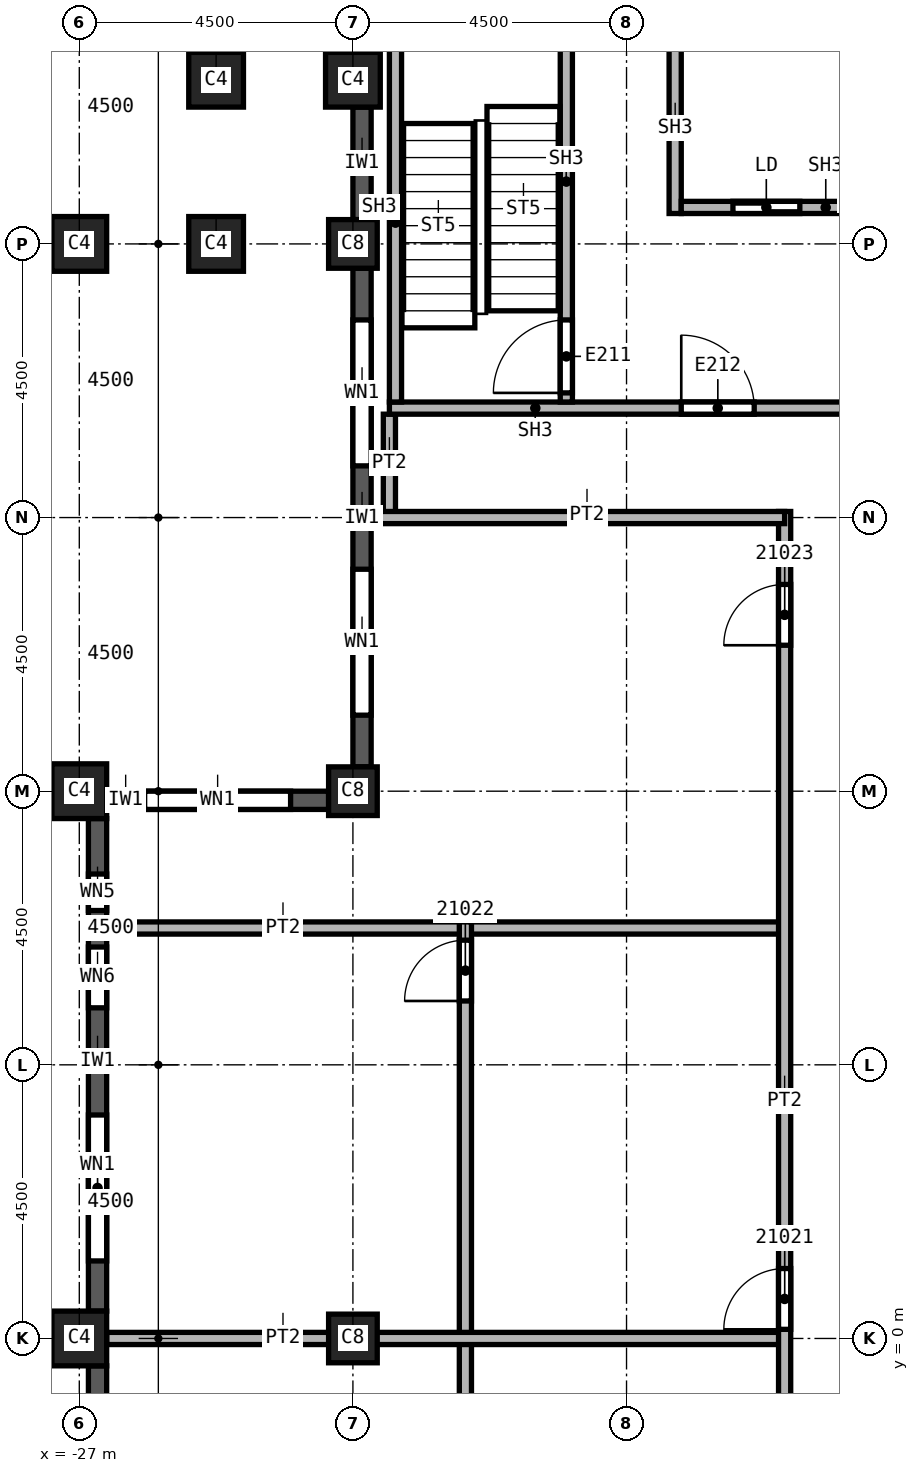
"""IFC4 building model, lengths in metres.
Left out: names, types, materials, properties, quantities, classifications, styles, units other than length and angle.
Written with IfcOpenShell. Run it as: python <this file> out.ifc"""

import sys

from ifc_helpers import new_model, si_unit, direction, frame, frame_2d, origin, origin_2d, place, context, subcontext, project, spatial, rectangle, extrude, element, fill, save


model = new_model("IFC4")
c1 = context("Model", 3, precision=1e-05, world=origin(), true_north=direction((0.0, 1.0)))
c2 = subcontext(c1, "Body", "Model", "MODEL_VIEW")
j1 = project(units=[si_unit("LENGTHUNIT", "METRE"), si_unit("PLANEANGLEUNIT", "RADIAN")], contexts=[c1])
p1 = place(None, origin())
s1 = spatial("IfcSite", under=j1, at=p1, CompositionType="ELEMENT")
p2 = place(p1, origin())
s2 = spatial("IfcBuilding", under=s1, at=p2, CompositionType="ELEMENT")
p3 = place(p2, frame((0.0, 0.0, 300.0)))
s3 = spatial("IfcBuildingStorey", under=s2, at=p3, CompositionType="ELEMENT", Elevation=300.0)
for number, where, z_axis, x_axis in (
    (1, (-22.5, 0.0, 0.0), (0.0, 0.0, 1.0), (1.0, 0.0, 0.0)),
    (2, (-22.5, 9.0, 0.0), (0.0, 0.0, 1.0), (1.0, 0.0, 0.0)),
    (3, (-22.5, 18.0, 0.0), (0.0, 0.0, 1.0), (1.0, 0.0, 0.0)),
):
    element("IfcColumn", number, at=place(p3, frame(where, z_axis=z_axis, x_axis=x_axis)), inside=s3, PredefinedType="COLUMN", context=c2, shape_type="SweptSolid", body=[
        extrude(rectangle(XDim=0.8, YDim=0.8, at=origin_2d()), origin(), (0.0, 0.0, 1.0), 3.74),
    ])
for number, where, z_axis, x_axis in (
    (4, (-27.0, 0.0, 0.0), (0.0, 0.0, 1.0), (0.0, 1.0, 0.0)),
    (5, (-27.0, 9.0, 0.0), (0.0, 0.0, 1.0), (0.0, 1.0, 0.0)),
    (6, (-27.0, 18.0, 0.0), (0.0, 0.0, 1.0), (0.0, 1.0, 0.0)),
    (7, (-22.5, 20.7, 0.0), (0.0, 0.0, 1.0), (1.0, 0.0, 0.0)),
    (8, (-24.75, 20.7, 0.0), (0.0, 0.0, 1.0), (1.0, 0.0, 0.0)),
    (9, (-24.75, 18.0, 0.0), (0.0, 0.0, 1.0), (1.0, 0.0, 0.0)),
):
    element("IfcColumn", number, at=place(p3, frame(where, z_axis=z_axis, x_axis=x_axis)), inside=s3, PredefinedType="COLUMN", context=c2, shape_type="SweptSolid", body=[
        extrude(rectangle(XDim=0.9, YDim=0.9, at=origin_2d()), origin(), (0.0, 0.0, 1.0), 3.74),
    ])
p4 = place(p3, frame((-26.7, 8.55, 0.0), z_axis=(0.0, 0.0, 1.0), x_axis=(0.0, -1.0, 0.0)))
e10 = element("IfcWall", 10, at=p4, inside=s3, PredefinedType="SOLIDWALL", context=c2, shape_type="SweptSolid", body=[
    extrude(rectangle(XDim=8.1, YDim=0.3, at=frame_2d((4.05, 0.0))), origin(), (0.0, 0.0, 1.0), 3.14),
])
p5 = place(p4, frame((4.875, 0.0, 0.8)))
e11 = element("IfcOpeningElement", 11, at=p5, cuts=e10, PredefinedType="OPENING", context=c2, shape_type="SweptSolid", body=[
    extrude(rectangle(XDim=2.4, YDim=1.95, at=frame_2d((1.2, 0.975))), frame((0.0, 0.15, 0.0), z_axis=(0.0, -1.0, 0.0), x_axis=(1.0, 0.0, 0.0)), (0.0, 0.0, 1.0), 0.3),
])
p6 = place(p4, frame((0.913, 0.0, 0.8)))
e12 = element("IfcOpeningElement", 12, at=p6, cuts=e10, PredefinedType="OPENING", context=c2, shape_type="SweptSolid", body=[
    extrude(rectangle(XDim=0.6, YDim=1.95, at=frame_2d((0.3, 0.975))), frame((0.0, 0.15, 0.0), z_axis=(0.0, -1.0, 0.0), x_axis=(1.0, 0.0, 0.0)), (0.0, 0.0, 1.0), 0.3),
])
p7 = place(p4, frame((2.113, 0.0, 0.8)))
e13 = element("IfcOpeningElement", 13, at=p7, cuts=e10, PredefinedType="OPENING", context=c2, shape_type="SweptSolid", body=[
    extrude(rectangle(XDim=1.0, YDim=1.95, at=frame_2d((0.5, 0.975))), frame((0.0, 0.15, 0.0), z_axis=(0.0, -1.0, 0.0), x_axis=(1.0, 0.0, 0.0)), (0.0, 0.0, 1.0), 0.3),
])
p8 = place(p3, frame((-26.7, -0.45, 0.0), z_axis=(0.0, 0.0, 1.0), x_axis=(0.0, -1.0, 0.0)))
e14 = element("IfcWall", 14, at=p8, inside=s3, PredefinedType="SOLIDWALL", context=c2, shape_type="SweptSolid", body=[
    extrude(rectangle(XDim=8.1, YDim=0.3, at=frame_2d((4.05, 0.0))), origin(), (0.0, 0.0, 1.0), 3.14),
])
p9 = place(p8, frame((0.825, 0.0, 0.8)))
e15 = element("IfcOpeningElement", 15, at=p9, cuts=e14, PredefinedType="OPENING", context=c2, shape_type="SweptSolid", body=[
    extrude(rectangle(XDim=2.4, YDim=1.95, at=frame_2d((1.2, 0.975))), frame((0.0, 0.15, 0.0), z_axis=(0.0, -1.0, 0.0), x_axis=(1.0, 0.0, 0.0)), (0.0, 0.0, 1.0), 0.3),
])
p10 = place(p8, frame((4.875, 0.0, 0.8)))
e16 = element("IfcOpeningElement", 16, at=p10, cuts=e14, PredefinedType="OPENING", context=c2, shape_type="SweptSolid", body=[
    extrude(rectangle(XDim=2.4, YDim=1.95, at=frame_2d((1.2, 0.975))), frame((0.0, 0.15, 0.0), z_axis=(0.0, -1.0, 0.0), x_axis=(1.0, 0.0, 0.0)), (0.0, 0.0, 1.0), 0.3),
])
p11 = place(p3, frame((-22.35, 17.6, 0.0), z_axis=(0.0, 0.0, 1.0), x_axis=(0.0, -1.0, 0.0)))
e17 = element("IfcWall", 17, at=p11, inside=s3, PredefinedType="SOLIDWALL", context=c2, shape_type="SweptSolid", body=[
    extrude(rectangle(XDim=8.2, YDim=0.3, at=frame_2d((4.1, 0.0))), origin(), (0.0, 0.0, 1.0), 3.14),
])
p12 = place(p11, frame((0.85, 0.0, 0.8)))
e18 = element("IfcOpeningElement", 18, at=p12, cuts=e17, PredefinedType="OPENING", context=c2, shape_type="SweptSolid", body=[
    extrude(rectangle(XDim=2.4, YDim=1.95, at=frame_2d((1.2, 0.975))), frame((0.0, 0.15, 0.0), z_axis=(0.0, -1.0, 0.0), x_axis=(1.0, 0.0, 0.0)), (0.0, 0.0, 1.0), 0.3),
])
p13 = place(p11, frame((4.95, 0.0, 0.8)))
e19 = element("IfcOpeningElement", 19, at=p13, cuts=e17, PredefinedType="OPENING", context=c2, shape_type="SweptSolid", body=[
    extrude(rectangle(XDim=2.4, YDim=1.95, at=frame_2d((1.2, 0.975))), frame((0.0, 0.15, 0.0), z_axis=(0.0, -1.0, 0.0), x_axis=(1.0, 0.0, 0.0)), (0.0, 0.0, 1.0), 0.3),
])
p14 = place(p3, frame((-22.35, 20.25, 0.0), z_axis=(0.0, 0.0, 1.0), x_axis=(0.0, -1.0, 0.0)))
e20 = element("IfcWall", 20, at=p14, inside=s3, PredefinedType="SOLIDWALL", context=c2, shape_type="SweptSolid", body=[
    extrude(rectangle(XDim=1.85, YDim=0.3, at=frame_2d((0.925, 0.0))), origin(), (0.0, 0.0, 1.0), 3.14),
])
p15 = place(p3, frame((-22.9, 8.85, 0.0), z_axis=(0.0, 0.0, 1.0), x_axis=(-1.0, 0.0, 0.0)))
e21 = element("IfcWall", 21, at=p15, inside=s3, PredefinedType="SOLIDWALL", context=c2, shape_type="SweptSolid", body=[
    extrude(rectangle(XDim=3.65, YDim=0.3, at=frame_2d((1.825, 0.0))), origin(), (0.0, 0.0, 1.0), 3.14),
])
p16 = place(p15, frame((0.625, 0.0, 0.8)))
e22 = element("IfcOpeningElement", 22, at=p16, cuts=e21, PredefinedType="OPENING", context=c2, shape_type="SweptSolid", body=[
    extrude(rectangle(XDim=2.4, YDim=1.95, at=frame_2d((1.2, 0.975))), frame((0.0, 0.15, 0.0), z_axis=(0.0, -1.0, 0.0), x_axis=(1.0, 0.0, 0.0)), (0.0, 0.0, 1.0), 0.3),
])
p17 = place(p3, frame((-26.55, 6.75, 0.0), z_axis=(0.0, 0.0, 1.0), x_axis=(1.0, 0.0, 0.0)))
e23 = element("IfcWall", 23, at=p17, inside=s3, PredefinedType="PARTITIONING", context=c2, shape_type="SweptSolid", body=[
    extrude(rectangle(XDim=11.15, YDim=0.2, at=frame_2d((5.575, 0.0))), origin(), (0.0, 0.0, 1.0), 3.74),
])
p18 = place(p3, frame((-21.9, 13.5, 0.0), z_axis=(0.0, 0.0, 1.0), x_axis=(0.0, 1.0, 0.0)))
e24 = element("IfcWall", 24, at=p18, inside=s3, PredefinedType="PARTITIONING", context=c2, shape_type="SweptSolid", body=[
    extrude(rectangle(XDim=1.7, YDim=0.2, at=frame_2d((0.85, 0.0))), origin(), (0.0, 0.0, 1.0), 3.74),
])
p19 = place(p3, frame((-20.65, -11.25, 0.0), z_axis=(0.0, 0.0, 1.0), x_axis=(0.0, 1.0, 0.0)))
e25 = element("IfcWall", 25, at=p19, inside=s3, PredefinedType="PARTITIONING", context=c2, shape_type="SweptSolid", body=[
    extrude(rectangle(XDim=18.1, YDim=0.2, at=frame_2d((9.05, 0.0))), origin(), (0.0, 0.0, 1.0), 3.74),
])
p20 = place(p19, frame((16.8, 0.0, 0.0)))
e26 = element("IfcOpeningElement", 26, at=p20, cuts=e25, PredefinedType="OPENING", context=c2, shape_type="SweptSolid", body=[
    extrude(rectangle(XDim=1.0, YDim=2.1, at=frame_2d((0.5, 1.05))), frame((0.0, 0.1, 0.0), z_axis=(0.0, -1.0, 0.0), x_axis=(1.0, 0.0, 0.0)), (0.0, 0.0, 1.0), 0.2),
])
p21 = place(p19, frame((3.1, 0.0, 0.0)))
e27 = element("IfcOpeningElement", 27, at=p21, cuts=e25, PredefinedType="OPENING", context=c2, shape_type="SweptSolid", body=[
    extrude(rectangle(XDim=1.0, YDim=2.1, at=frame_2d((0.5, 1.05))), frame((0.0, 0.1, 0.0), z_axis=(0.0, -1.0, 0.0), x_axis=(1.0, 0.0, 0.0)), (0.0, 0.0, 1.0), 0.2),
])
p22 = place(p3, frame((-15.4, 0.0, 0.0), z_axis=(0.0, 0.0, 1.0), x_axis=(-1.0, 0.0, 0.0)))
e28 = element("IfcWall", 28, at=p22, inside=s3, PredefinedType="PARTITIONING", context=c2, shape_type="SweptSolid", body=[
    extrude(rectangle(XDim=11.15, YDim=0.2, at=frame_2d((5.575, 0.0))), origin(), (0.0, 0.0, 1.0), 3.74),
])
p23 = place(p3, frame((-15.4, -22.95, 0.0), z_axis=(0.0, 0.0, 1.0), x_axis=(0.0, 1.0, 0.0)))
e29 = element("IfcWall", 29, at=p23, inside=s3, PredefinedType="PARTITIONING", context=c2, shape_type="SweptSolid", body=[
    extrude(rectangle(XDim=36.55, YDim=0.2, at=frame_2d((18.275, 0.0))), origin(), (0.0, 0.0, 1.0), 3.74),
])
p24 = place(p23, frame((23.1, 0.0, 0.0)))
e30 = element("IfcOpeningElement", 30, at=p24, cuts=e29, PredefinedType="OPENING", context=c2, shape_type="SweptSolid", body=[
    extrude(rectangle(XDim=1.0, YDim=2.1, at=frame_2d((0.5, 1.05))), frame((0.0, 0.1, 0.0), z_axis=(0.0, -1.0, 0.0), x_axis=(1.0, 0.0, 0.0)), (0.0, 0.0, 1.0), 0.2),
])
p25 = place(p23, frame((34.35, 0.0, 0.0)))
e31 = element("IfcOpeningElement", 31, at=p25, cuts=e29, PredefinedType="OPENING", context=c2, shape_type="SweptSolid", body=[
    extrude(rectangle(XDim=1.0, YDim=2.1, at=frame_2d((0.5, 1.05))), frame((0.0, 0.1, 0.0), z_axis=(0.0, -1.0, 0.0), x_axis=(1.0, 0.0, 0.0)), (0.0, 0.0, 1.0), 0.2),
])
p26 = place(p23, frame((2.95, 0.0, 0.0)))
e32 = element("IfcOpeningElement", 32, at=p26, cuts=e29, PredefinedType="OPENING", context=c2, shape_type="SweptSolid", body=[
    extrude(rectangle(XDim=1.0, YDim=2.1, at=frame_2d((0.5, 1.05))), frame((0.0, 0.1, 0.0), z_axis=(0.0, -1.0, 0.0), x_axis=(1.0, 0.0, 0.0)), (0.0, 0.0, 1.0), 0.2),
])
p27 = place(p23, frame((6.15, 0.0, 0.0)))
e33 = element("IfcOpeningElement", 33, at=p27, cuts=e29, PredefinedType="OPENING", context=c2, shape_type="SweptSolid", body=[
    extrude(rectangle(XDim=1.0, YDim=2.1, at=frame_2d((0.5, 1.05))), frame((0.0, 0.1, 0.0), z_axis=(0.0, -1.0, 0.0), x_axis=(1.0, 0.0, 0.0)), (0.0, 0.0, 1.0), 0.2),
])
p28 = place(p23, frame((8.625, 0.0, 0.0)))
e34 = element("IfcOpeningElement", 34, at=p28, cuts=e29, PredefinedType="OPENING", context=c2, shape_type="SweptSolid", body=[
    extrude(rectangle(XDim=1.0, YDim=2.1, at=frame_2d((0.5, 1.05))), frame((0.0, 0.1, 0.0), z_axis=(0.0, -1.0, 0.0), x_axis=(1.0, 0.0, 0.0)), (0.0, 0.0, 1.0), 0.2),
])
p29 = place(p23, frame((15.0, 0.0, 0.0)))
e35 = element("IfcOpeningElement", 35, at=p29, cuts=e29, PredefinedType="OPENING", context=c2, shape_type="SweptSolid", body=[
    extrude(rectangle(XDim=1.0, YDim=2.1, at=frame_2d((0.5, 1.05))), frame((0.0, 0.1, 0.0), z_axis=(0.0, -1.0, 0.0), x_axis=(1.0, 0.0, 0.0)), (0.0, 0.0, 1.0), 0.2),
])
p30 = place(p3, frame((-15.4, 13.5, 0.0), z_axis=(0.0, 0.0, 1.0), x_axis=(-1.0, 0.0, 0.0)))
e36 = element("IfcWall", 36, at=p30, inside=s3, PredefinedType="PARTITIONING", context=c2, shape_type="SweptSolid", body=[
    extrude(rectangle(XDim=6.8, YDim=0.2, at=frame_2d((3.4, 0.0))), origin(), (0.0, 0.0, 1.0), 3.74),
])
p31 = place(p3, frame((-21.9, 15.3, 0.0), z_axis=(0.0, 0.0, 1.0), x_axis=(1.0, 0.0, 0.0)))
e37 = element("IfcWall", 37, at=p31, inside=s3, PredefinedType="SOLIDWALL", context=c2, shape_type="SweptSolid", body=[
    extrude(rectangle(XDim=8.275, YDim=0.2, at=frame_2d((4.137, 0.0))), origin(), (0.0, 0.0, 1.0), 3.74),
])
p32 = place(p31, frame((4.8, 0.0, 0.0)))
e38 = element("IfcOpeningElement", 38, at=p32, cuts=e37, PredefinedType="OPENING", context=c2, shape_type="SweptSolid", body=[
    extrude(rectangle(XDim=1.2, YDim=2.1, at=frame_2d((0.6, 1.05))), frame((0.0, 0.1, 0.0), z_axis=(0.0, -1.0, 0.0), x_axis=(1.0, 0.0, 0.0)), (0.0, 0.0, 1.0), 0.2),
])
p33 = place(p3, frame((-21.8, 15.4, 0.0), z_axis=(0.0, 0.0, 1.0), x_axis=(0.0, 1.0, 0.0)))
e39 = element("IfcWall", 39, at=p33, inside=s3, PredefinedType="SOLIDWALL", context=c2, shape_type="SweptSolid", body=[
    extrude(rectangle(XDim=5.9, YDim=0.2, at=frame_2d((2.95, 0.0))), origin(), (0.0, 0.0, 1.0), 3.74),
])
p34 = place(p3, frame((-18.99, 15.4, 0.0), z_axis=(0.0, 0.0, 1.0), x_axis=(0.0, 1.0, 0.0)))
e40 = element("IfcWall", 40, at=p34, inside=s3, PredefinedType="SOLIDWALL", context=c2, shape_type="SweptSolid", body=[
    extrude(rectangle(XDim=5.9, YDim=0.2, at=frame_2d((2.95, 0.0))), origin(), (0.0, 0.0, 1.0), 3.74),
])
p35 = place(p34, frame((0.15, 0.0, 0.0)))
e41 = element("IfcOpeningElement", 41, at=p35, cuts=e40, PredefinedType="OPENING", context=c2, shape_type="SweptSolid", body=[
    extrude(rectangle(XDim=1.2, YDim=2.1, at=frame_2d((0.6, 1.05))), frame((0.0, 0.1, 0.0), z_axis=(0.0, -1.0, 0.0), x_axis=(1.0, 0.0, 0.0)), (0.0, 0.0, 1.0), 0.2),
])
p36 = place(p3, frame((-17.2, 18.5, 0.0), z_axis=(0.0, 0.0, 1.0), x_axis=(0.0, 1.0, 0.0)))
e42 = element("IfcWall", 42, at=p36, inside=s3, PredefinedType="SOLIDWALL", context=c2, shape_type="SweptSolid", body=[
    extrude(rectangle(XDim=2.8, YDim=0.2, at=frame_2d((1.4, 0.0))), origin(), (0.0, 0.0, 1.0), 3.74),
])
p37 = place(p3, frame((-17.1, 18.6, 0.0), z_axis=(0.0, 0.0, 1.0), x_axis=(1.0, 0.0, 0.0)))
e43 = element("IfcWall", 43, at=p37, inside=s3, PredefinedType="SOLIDWALL", context=c2, shape_type="SweptSolid", body=[
    extrude(rectangle(XDim=2.8, YDim=0.2, at=frame_2d((1.4, 0.0))), origin(), (0.0, 0.0, 1.0), 3.74),
])
p38 = place(p37, frame((0.85, 0.0, 0.0)))
e44 = element("IfcOpeningElement", 44, at=p38, cuts=e43, PredefinedType="OPENING", context=c2, shape_type="SweptSolid", body=[
    extrude(rectangle(XDim=1.1, YDim=2.1, at=frame_2d((0.55, 1.05))), frame((0.0, 0.1, 0.0), z_axis=(0.0, -1.0, 0.0), x_axis=(1.0, 0.0, 0.0)), (0.0, 0.0, 1.0), 0.2),
])
p39 = place(p5, origin())
e45 = element("IfcWindow", 45, at=p39, inside=s3, PartitioningType="SINGLE_PANEL", PredefinedType="WINDOW", context=c2, shape_type="SweptSolid", body=[
    extrude(rectangle(XDim=2.4, YDim=1.95, at=frame_2d((1.2, 0.975))), frame((0.0, 0.03, 0.0), z_axis=(0.0, -1.0, 0.0), x_axis=(1.0, 0.0, 0.0)), (0.0, 0.0, 1.0), 0.06),
])
fill(e11, e45)
p40 = place(p12, origin())
e46 = element("IfcWindow", 46, at=p40, inside=s3, PartitioningType="SINGLE_PANEL", PredefinedType="WINDOW", context=c2, shape_type="SweptSolid", body=[
    extrude(rectangle(XDim=2.4, YDim=1.95, at=frame_2d((1.2, 0.975))), frame((0.0, 0.03, 0.0), z_axis=(0.0, -1.0, 0.0), x_axis=(1.0, 0.0, 0.0)), (0.0, 0.0, 1.0), 0.06),
])
fill(e18, e46)
p41 = place(p13, origin())
e47 = element("IfcWindow", 47, at=p41, inside=s3, PartitioningType="SINGLE_PANEL", PredefinedType="WINDOW", context=c2, shape_type="SweptSolid", body=[
    extrude(rectangle(XDim=2.4, YDim=1.95, at=frame_2d((1.2, 0.975))), frame((0.0, 0.03, 0.0), z_axis=(0.0, -1.0, 0.0), x_axis=(1.0, 0.0, 0.0)), (0.0, 0.0, 1.0), 0.06),
])
fill(e19, e47)
p42 = place(p16, origin())
e48 = element("IfcWindow", 48, at=p42, inside=s3, PartitioningType="SINGLE_PANEL", PredefinedType="WINDOW", context=c2, shape_type="SweptSolid", body=[
    extrude(rectangle(XDim=2.4, YDim=1.95, at=frame_2d((1.2, 0.975))), frame((0.0, 0.03, 0.0), z_axis=(0.0, -1.0, 0.0), x_axis=(1.0, 0.0, 0.0)), (0.0, 0.0, 1.0), 0.06),
])
fill(e22, e48)
p43 = place(p24, origin())
e49 = element("IfcDoor", 49, at=p43, inside=s3, OperationType="SINGLE_SWING_RIGHT", PredefinedType="DOOR", context=c2, shape_type="SweptSolid", body=[
    extrude(rectangle(XDim=1.0, YDim=2.1, at=frame_2d((0.5, 1.05))), frame((0.0, 0.025, 0.0), z_axis=(0.0, -1.0, 0.0), x_axis=(1.0, 0.0, 0.0)), (0.0, 0.0, 1.0), 0.05),
])
fill(e30, e49)
p44 = place(p20, origin())
e50 = element("IfcDoor", 50, at=p44, inside=s3, OperationType="SINGLE_SWING_LEFT", PredefinedType="DOOR", context=c2, shape_type="SweptSolid", body=[
    extrude(rectangle(XDim=1.0, YDim=2.1, at=frame_2d((0.5, 1.05))), frame((0.0, 0.025, 0.0), z_axis=(0.0, -1.0, 0.0), x_axis=(1.0, 0.0, 0.0)), (0.0, 0.0, 1.0), 0.05),
])
fill(e26, e50)
p45 = place(p25, origin())
e51 = element("IfcDoor", 51, at=p45, inside=s3, OperationType="SINGLE_SWING_RIGHT", PredefinedType="DOOR", context=c2, shape_type="SweptSolid", body=[
    extrude(rectangle(XDim=1.0, YDim=2.1, at=frame_2d((0.5, 1.05))), frame((0.0, 0.025, 0.0), z_axis=(0.0, -1.0, 0.0), x_axis=(1.0, 0.0, 0.0)), (0.0, 0.0, 1.0), 0.05),
])
fill(e31, e51)
p46 = place(p35, origin())
e52 = element("IfcDoor", 52, at=p46, inside=s3, OperationType="SINGLE_SWING_LEFT", PredefinedType="DOOR", context=c2, shape_type="SweptSolid", body=[
    extrude(rectangle(XDim=1.2, YDim=2.1, at=frame_2d((0.6, 1.05))), frame((0.0, 0.025, 0.0), z_axis=(0.0, -1.0, 0.0), x_axis=(1.0, 0.0, 0.0)), (0.0, 0.0, 1.0), 0.05),
])
fill(e41, e52)
p47 = place(p38, origin())
e53 = element("IfcDoor", 53, at=p47, inside=s3, OperationType="SLIDING_TO_LEFT", PredefinedType="DOOR", context=c2, shape_type="SweptSolid", body=[
    extrude(rectangle(XDim=1.1, YDim=2.1, at=frame_2d((0.55, 1.05))), frame((0.0, 0.025, 0.0), z_axis=(0.0, -1.0, 0.0), x_axis=(1.0, 0.0, 0.0)), (0.0, 0.0, 1.0), 0.05),
])
fill(e44, e53)
p48 = place(p32, origin())
e54 = element("IfcDoor", 54, at=p48, inside=s3, OperationType="SINGLE_SWING_RIGHT", PredefinedType="DOOR", context=c2, shape_type="SweptSolid", body=[
    extrude(rectangle(XDim=1.2, YDim=2.1, at=frame_2d((0.6, 1.05))), frame((0.0, 0.025, 0.0), z_axis=(0.0, -1.0, 0.0), x_axis=(1.0, 0.0, 0.0)), (0.0, 0.0, 1.0), 0.05),
])
fill(e38, e54)
p49 = place(p6, origin())
e55 = element("IfcWindow", 55, at=p49, inside=s3, PartitioningType="SINGLE_PANEL", PredefinedType="WINDOW", context=c2, shape_type="SweptSolid", body=[
    extrude(rectangle(XDim=0.6, YDim=1.95, at=frame_2d((0.3, 0.975))), frame((0.0, 0.03, 0.0), z_axis=(0.0, -1.0, 0.0), x_axis=(1.0, 0.0, 0.0)), (0.0, 0.0, 1.0), 0.06),
])
fill(e12, e55)
p50 = place(p7, origin())
e56 = element("IfcWindow", 56, at=p50, inside=s3, PartitioningType="SINGLE_PANEL", PredefinedType="WINDOW", context=c2, shape_type="SweptSolid", body=[
    extrude(rectangle(XDim=1.0, YDim=1.95, at=frame_2d((0.5, 0.975))), frame((0.0, 0.03, 0.0), z_axis=(0.0, -1.0, 0.0), x_axis=(1.0, 0.0, 0.0)), (0.0, 0.0, 1.0), 0.06),
])
fill(e13, e56)
save(model, sys.argv[1])
